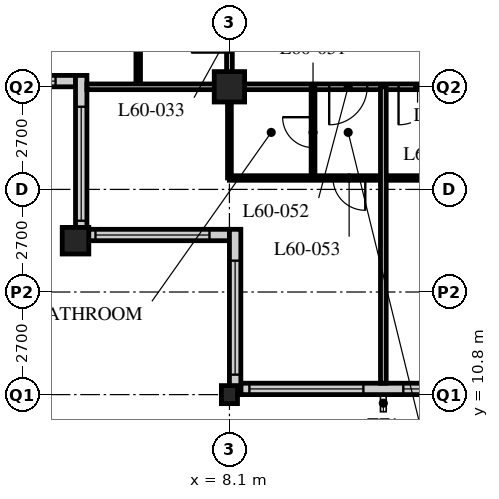
"""IFC4 building model, lengths in metres.
Left out: names, types, materials, properties, quantities, classifications, styles, units other than length and angle.
Written with IfcOpenShell. Run it as: python <this file> out.ifc"""

import sys

from ifc_helpers import new_model, si_unit, direction, frame, frame_2d, origin, origin_2d, place, context, subcontext, project, spatial, rectangle, hollow_rectangle, i_section, extrude, element, fill, save


model = new_model("IFC4")
c1 = context("Model", 3, precision=1e-05, world=origin(), true_north=direction((0.0, 1.0)))
c2 = subcontext(c1, "Body", "Model", "MODEL_VIEW")
j1 = project(units=[si_unit("LENGTHUNIT", "METRE"), si_unit("PLANEANGLEUNIT", "RADIAN")], contexts=[c1])
p1 = place(None, origin())
s1 = spatial("IfcSite", under=j1, at=p1, CompositionType="ELEMENT")
p2 = place(p1, origin())
s2 = spatial("IfcBuilding", under=s1, at=p2, CompositionType="ELEMENT")
p3 = place(p2, frame((0.0, 0.0, 231.6)))
s3 = spatial("IfcBuildingStorey", under=s2, at=p3, CompositionType="ELEMENT", Elevation=231.6)
p4 = place(p3, frame((4.05, 14.85, 0.0), z_axis=(0.0, 0.0, 1.0), x_axis=(1.0, 0.0, 0.0)))
e1 = element("IfcColumn", 1, at=p4, inside=s3, PredefinedType="COLUMN", context=c2, shape_type="SweptSolid", body=[
    extrude(hollow_rectangle(XDim=0.7, YDim=0.7, WallThickness=0.07, at=origin_2d()), origin(), (0.0, 0.0, 1.0), 3.6),
])
p5 = place(p3, frame((8.1, 10.8, 0.0), z_axis=(0.0, 0.0, 1.0), x_axis=(1.0, 0.0, 0.0)))
e2 = element("IfcColumn", 2, at=p5, inside=s3, PredefinedType="COLUMN", context=c2, shape_type="SweptSolid", body=[
    extrude(i_section(OverallWidth=0.424, OverallDepth=0.475, WebThickness=0.048, FlangeThickness=0.077, FilletRadius=0.015, at=origin_2d()), origin(), (0.0, 0.0, 1.0), 3.6),
])
p6 = place(p3, frame((8.1, 18.9, 0.0), z_axis=(0.0, 0.0, 1.0), x_axis=(1.0, 0.0, 0.0)))
e3 = element("IfcColumn", 3, at=p6, inside=s3, PredefinedType="COLUMN", context=c2, shape_type="SweptSolid", body=[
    extrude(hollow_rectangle(XDim=0.8, YDim=0.8, WallThickness=0.08, at=origin_2d()), origin(), (0.0, 0.0, 1.0), 3.6),
])
p7 = place(p3, frame((8.4, 10.95, 0.0), z_axis=(0.0, 0.0, 1.0), x_axis=(1.0, 0.0, 0.0)))
e4 = element("IfcWall", 4, at=p7, inside=s3, PredefinedType="SOLIDWALL", context=c2, shape_type="SweptSolid", body=[
    extrude(rectangle(XDim=40.2, YDim=0.3, at=frame_2d((20.1, 0.0))), origin(), (0.0, 0.0, 1.0), 2.35),
])
p8 = place(p7, frame((0.225, 0.0, 0.6)))
e5 = element("IfcOpeningElement", 5, at=p8, cuts=e4, PredefinedType="OPENING", context=c2, shape_type="SweptSolid", body=[
    extrude(rectangle(XDim=3.0, YDim=1.7, at=frame_2d((1.5, 0.85))), frame((0.0, 0.16, 0.0), z_axis=(0.0, -1.0, 0.0), x_axis=(1.0, 0.0, 0.0)), (0.0, 0.0, 1.0), 0.32),
])
p9 = place(p7, frame((4.275, 0.0, 0.6)))
e6 = element("IfcOpeningElement", 6, at=p9, cuts=e4, PredefinedType="OPENING", context=c2, shape_type="SweptSolid", body=[
    extrude(rectangle(XDim=3.0, YDim=1.7, at=frame_2d((1.5, 0.85))), frame((0.0, 0.16, 0.0), z_axis=(0.0, -1.0, 0.0), x_axis=(1.0, 0.0, 0.0)), (0.0, 0.0, 1.0), 0.32),
])
p10 = place(p7, frame((8.325, 0.0, 0.6)))
e7 = element("IfcOpeningElement", 7, at=p10, cuts=e4, PredefinedType="OPENING", context=c2, shape_type="SweptSolid", body=[
    extrude(rectangle(XDim=3.0, YDim=1.7, at=frame_2d((1.5, 0.85))), frame((0.0, 0.16, 0.0), z_axis=(0.0, -1.0, 0.0), x_axis=(1.0, 0.0, 0.0)), (0.0, 0.0, 1.0), 0.32),
])
p11 = place(p7, frame((12.375, 0.0, 0.6)))
e8 = element("IfcOpeningElement", 8, at=p11, cuts=e4, PredefinedType="OPENING", context=c2, shape_type="SweptSolid", body=[
    extrude(rectangle(XDim=3.0, YDim=1.7, at=frame_2d((1.5, 0.85))), frame((0.0, 0.16, 0.0), z_axis=(0.0, -1.0, 0.0), x_axis=(1.0, 0.0, 0.0)), (0.0, 0.0, 1.0), 0.32),
])
p12 = place(p7, frame((16.425, 0.0, 0.6)))
e9 = element("IfcOpeningElement", 9, at=p12, cuts=e4, PredefinedType="OPENING", context=c2, shape_type="SweptSolid", body=[
    extrude(rectangle(XDim=3.0, YDim=1.7, at=frame_2d((1.5, 0.85))), frame((0.0, 0.16, 0.0), z_axis=(0.0, -1.0, 0.0), x_axis=(1.0, 0.0, 0.0)), (0.0, 0.0, 1.0), 0.32),
])
p13 = place(p7, frame((20.475, 0.0, 0.6)))
e10 = element("IfcOpeningElement", 10, at=p13, cuts=e4, PredefinedType="OPENING", context=c2, shape_type="SweptSolid", body=[
    extrude(rectangle(XDim=3.0, YDim=1.7, at=frame_2d((1.5, 0.85))), frame((0.0, 0.16, 0.0), z_axis=(0.0, -1.0, 0.0), x_axis=(1.0, 0.0, 0.0)), (0.0, 0.0, 1.0), 0.32),
])
p14 = place(p7, frame((24.525, 0.0, 0.6)))
e11 = element("IfcOpeningElement", 11, at=p14, cuts=e4, PredefinedType="OPENING", context=c2, shape_type="SweptSolid", body=[
    extrude(rectangle(XDim=3.0, YDim=1.7, at=frame_2d((1.5, 0.85))), frame((0.0, 0.16, 0.0), z_axis=(0.0, -1.0, 0.0), x_axis=(1.0, 0.0, 0.0)), (0.0, 0.0, 1.0), 0.32),
])
p15 = place(p7, frame((28.575, 0.0, 0.6)))
e12 = element("IfcOpeningElement", 12, at=p15, cuts=e4, PredefinedType="OPENING", context=c2, shape_type="SweptSolid", body=[
    extrude(rectangle(XDim=3.0, YDim=1.7, at=frame_2d((1.5, 0.85))), frame((0.0, 0.16, 0.0), z_axis=(0.0, -1.0, 0.0), x_axis=(1.0, 0.0, 0.0)), (0.0, 0.0, 1.0), 0.32),
])
p16 = place(p7, frame((32.625, 0.0, 0.6)))
e13 = element("IfcOpeningElement", 13, at=p16, cuts=e4, PredefinedType="OPENING", context=c2, shape_type="SweptSolid", body=[
    extrude(rectangle(XDim=3.0, YDim=1.7, at=frame_2d((1.5, 0.85))), frame((0.0, 0.16, 0.0), z_axis=(0.0, -1.0, 0.0), x_axis=(1.0, 0.0, 0.0)), (0.0, 0.0, 1.0), 0.32),
])
p17 = place(p7, frame((36.675, 0.0, 0.6)))
e14 = element("IfcOpeningElement", 14, at=p17, cuts=e4, PredefinedType="OPENING", context=c2, shape_type="SweptSolid", body=[
    extrude(rectangle(XDim=3.0, YDim=1.7, at=frame_2d((1.5, 0.85))), frame((0.0, 0.16, 0.0), z_axis=(0.0, -1.0, 0.0), x_axis=(1.0, 0.0, 0.0)), (0.0, 0.0, 1.0), 0.32),
])
p18 = place(p3, frame((0.3, 19.05, 0.0), z_axis=(0.0, 0.0, 1.0), x_axis=(1.0, 0.0, 0.0)))
e15 = element("IfcWall", 15, at=p18, inside=s3, PredefinedType="SOLIDWALL", context=c2, shape_type="SweptSolid", body=[
    extrude(rectangle(XDim=3.75, YDim=0.3, at=frame_2d((1.875, 0.0))), origin(), (0.0, 0.0, 1.0), 2.35),
])
p19 = place(p18, frame((0.225, 0.0, 0.6)))
e16 = element("IfcOpeningElement", 16, at=p19, cuts=e15, PredefinedType="OPENING", context=c2, shape_type="SweptSolid", body=[
    extrude(rectangle(XDim=3.0, YDim=1.7, at=frame_2d((1.5, 0.85))), frame((0.0, 0.16, 0.0), z_axis=(0.0, -1.0, 0.0), x_axis=(1.0, 0.0, 0.0)), (0.0, 0.0, 1.0), 0.32),
])
p20 = place(p3, frame((4.2, 19.2, 0.0), z_axis=(0.0, 0.0, 1.0), x_axis=(0.0, -1.0, 0.0)))
e17 = element("IfcWall", 17, at=p20, inside=s3, PredefinedType="SOLIDWALL", context=c2, shape_type="SweptSolid", body=[
    extrude(rectangle(XDim=4.35, YDim=0.3, at=frame_2d((2.175, 0.0))), origin(), (0.0, 0.0, 1.0), 2.65),
])
p21 = place(p20, frame((0.825, 0.0, 0.6)))
e18 = element("IfcOpeningElement", 18, at=p21, cuts=e17, PredefinedType="OPENING", context=c2, shape_type="SweptSolid", body=[
    extrude(rectangle(XDim=3.0, YDim=1.7, at=frame_2d((1.5, 0.85))), frame((0.0, 0.16, 0.0), z_axis=(0.0, -1.0, 0.0), x_axis=(1.0, 0.0, 0.0)), (0.0, 0.0, 1.0), 0.32),
])
p22 = place(p3, frame((4.35, 15.0, 0.0), z_axis=(0.0, 0.0, 1.0), x_axis=(1.0, 0.0, 0.0)))
e19 = element("IfcWall", 19, at=p22, inside=s3, PredefinedType="SOLIDWALL", context=c2, shape_type="SweptSolid", body=[
    extrude(rectangle(XDim=3.75, YDim=0.3, at=frame_2d((1.875, 0.0))), origin(), (0.0, 0.0, 1.0), 2.65),
])
p23 = place(p22, frame((0.225, 0.0, 0.6)))
e20 = element("IfcOpeningElement", 20, at=p23, cuts=e19, PredefinedType="OPENING", context=c2, shape_type="SweptSolid", body=[
    extrude(rectangle(XDim=3.0, YDim=1.7, at=frame_2d((1.5, 0.85))), frame((0.0, 0.16, 0.0), z_axis=(0.0, -1.0, 0.0), x_axis=(1.0, 0.0, 0.0)), (0.0, 0.0, 1.0), 0.32),
])
p24 = place(p3, frame((8.25, 15.15, 0.0), z_axis=(0.0, 0.0, 1.0), x_axis=(0.0, -1.0, 0.0)))
e21 = element("IfcWall", 21, at=p24, inside=s3, PredefinedType="SOLIDWALL", context=c2, shape_type="SweptSolid", body=[
    extrude(rectangle(XDim=4.35, YDim=0.3, at=frame_2d((2.175, 0.0))), origin(), (0.0, 0.0, 1.0), 2.35),
])
p25 = place(p24, frame((0.825, 0.0, 0.6)))
e22 = element("IfcOpeningElement", 22, at=p25, cuts=e21, PredefinedType="OPENING", context=c2, shape_type="SweptSolid", body=[
    extrude(rectangle(XDim=3.0, YDim=1.7, at=frame_2d((1.5, 0.85))), frame((0.0, 0.16, 0.0), z_axis=(0.0, -1.0, 0.0), x_axis=(1.0, 0.0, 0.0)), (0.0, 0.0, 1.0), 0.32),
])
p26 = place(p3, frame((8.1, 18.9, 0.0), z_axis=(0.0, 0.0, 1.0), x_axis=(1.0, 0.0, 0.0)))
e23 = element("IfcWall", 23, at=p26, inside=s3, PredefinedType="PARTITIONING", context=c2, shape_type="SweptSolid", body=[
    extrude(rectangle(XDim=36.45, YDim=0.15, at=frame_2d((18.225, 0.0))), origin(), (0.0, 0.0, 1.0), 2.35),
])
p27 = place(p26, frame((4.45, 0.0, 0.0)))
e24 = element("IfcOpeningElement", 24, at=p27, cuts=e23, PredefinedType="OPENING", context=c2, shape_type="SweptSolid", body=[
    extrude(rectangle(XDim=1.0, YDim=2.1, at=frame_2d((0.5, 1.05))), frame((0.0, 0.085, 0.0), z_axis=(0.0, -1.0, 0.0), x_axis=(1.0, 0.0, 0.0)), (0.0, 0.0, 1.0), 0.17),
])
p28 = place(p26, frame((17.1, 0.0, 0.0)))
e25 = element("IfcOpeningElement", 25, at=p28, cuts=e23, PredefinedType="OPENING", context=c2, shape_type="SweptSolid", body=[
    extrude(rectangle(XDim=1.0, YDim=2.1, at=frame_2d((0.5, 1.05))), frame((0.0, 0.085, 0.0), z_axis=(0.0, -1.0, 0.0), x_axis=(1.0, 0.0, 0.0)), (0.0, 0.0, 1.0), 0.17),
])
p29 = place(p26, frame((29.05, 0.0, 0.0)))
e26 = element("IfcOpeningElement", 26, at=p29, cuts=e23, PredefinedType="OPENING", context=c2, shape_type="SweptSolid", body=[
    extrude(rectangle(XDim=1.0, YDim=2.1, at=frame_2d((0.5, 1.05))), frame((0.0, 0.085, 0.0), z_axis=(0.0, -1.0, 0.0), x_axis=(1.0, 0.0, 0.0)), (0.0, 0.0, 1.0), 0.17),
])
p30 = place(p26, frame((2.625, 0.0, 0.0)))
e27 = element("IfcOpeningElement", 27, at=p30, cuts=e23, PredefinedType="OPENING", context=c2, shape_type="SweptSolid", body=[
    extrude(rectangle(XDim=1.0, YDim=2.1, at=frame_2d((0.5, 1.05))), frame((0.0, 0.085, 0.0), z_axis=(0.0, -1.0, 0.0), x_axis=(1.0, 0.0, 0.0)), (0.0, 0.0, 1.0), 0.17),
])
p31 = place(p26, frame((33.925, 0.0, 0.0)))
e28 = element("IfcOpeningElement", 28, at=p31, cuts=e23, PredefinedType="OPENING", context=c2, shape_type="SweptSolid", body=[
    extrude(rectangle(XDim=1.0, YDim=2.1, at=frame_2d((0.5, 1.05))), frame((0.0, 0.085, 0.0), z_axis=(0.0, -1.0, 0.0), x_axis=(1.0, 0.0, 0.0)), (0.0, 0.0, 1.0), 0.17),
])
p32 = place(p3, frame((8.1, 18.9, 0.0), z_axis=(0.0, 0.0, 1.0), x_axis=(0.0, 1.0, 0.0)))
e29 = element("IfcWall", 29, at=p32, inside=s3, PredefinedType="PARTITIONING", context=c2, shape_type="SweptSolid", body=[
    extrude(rectangle(XDim=24.3, YDim=0.15, at=frame_2d((12.15, 0.0))), origin(), (0.0, 0.0, 1.0), 2.35),
])
p33 = place(p32, frame((0.9, 0.0, 0.0)))
e30 = element("IfcOpeningElement", 30, at=p33, cuts=e29, PredefinedType="OPENING", context=c2, shape_type="SweptSolid", body=[
    extrude(rectangle(XDim=1.0, YDim=2.1, at=frame_2d((0.5, 1.05))), frame((0.0, 0.085, 0.0), z_axis=(0.0, -1.0, 0.0), x_axis=(1.0, 0.0, 0.0)), (0.0, 0.0, 1.0), 0.17),
])
p34 = place(p32, frame((20.95, 0.0, 0.0)))
e31 = element("IfcOpeningElement", 31, at=p34, cuts=e29, PredefinedType="OPENING", context=c2, shape_type="SweptSolid", body=[
    extrude(rectangle(XDim=1.0, YDim=2.1, at=frame_2d((0.5, 1.05))), frame((0.0, 0.085, 0.0), z_axis=(0.0, -1.0, 0.0), x_axis=(1.0, 0.0, 0.0)), (0.0, 0.0, 1.0), 0.17),
])
p35 = place(p3, frame((5.7, 18.9, 0.0), z_axis=(0.0, 0.0, 1.0), x_axis=(0.0, 1.0, 0.0)))
e32 = element("IfcWall", 32, at=p35, inside=s3, PredefinedType="PARTITIONING", context=c2, shape_type="SweptSolid", body=[
    extrude(rectangle(XDim=20.25, YDim=0.12, at=frame_2d((10.125, 0.0))), origin(), (0.0, 0.0, 1.0), 3.35),
])
p36 = place(p35, frame((0.975, 0.0, 0.0)))
e33 = element("IfcOpeningElement", 33, at=p36, cuts=e32, PredefinedType="OPENING", context=c2, shape_type="SweptSolid", body=[
    extrude(rectangle(XDim=0.85, YDim=2.1, at=frame_2d((0.425, 1.05))), frame((0.0, 0.07, 0.0), z_axis=(0.0, -1.0, 0.0), x_axis=(1.0, 0.0, 0.0)), (0.0, 0.0, 1.0), 0.14),
])
p37 = place(p35, frame((8.425, 0.0, 0.0)))
e34 = element("IfcOpeningElement", 34, at=p37, cuts=e32, PredefinedType="OPENING", context=c2, shape_type="SweptSolid", body=[
    extrude(rectangle(XDim=0.85, YDim=2.1, at=frame_2d((0.425, 1.05))), frame((0.0, 0.07, 0.0), z_axis=(0.0, -1.0, 0.0), x_axis=(1.0, 0.0, 0.0)), (0.0, 0.0, 1.0), 0.14),
])
p38 = place(p35, frame((12.475, 0.0, 0.0)))
e35 = element("IfcOpeningElement", 35, at=p38, cuts=e32, PredefinedType="OPENING", context=c2, shape_type="SweptSolid", body=[
    extrude(rectangle(XDim=0.85, YDim=2.1, at=frame_2d((0.425, 1.05))), frame((0.0, 0.07, 0.0), z_axis=(0.0, -1.0, 0.0), x_axis=(1.0, 0.0, 0.0)), (0.0, 0.0, 1.0), 0.14),
])
p39 = place(p35, frame((16.525, 0.0, 0.0)))
e36 = element("IfcOpeningElement", 36, at=p39, cuts=e32, PredefinedType="OPENING", context=c2, shape_type="SweptSolid", body=[
    extrude(rectangle(XDim=0.85, YDim=2.1, at=frame_2d((0.425, 1.05))), frame((0.0, 0.07, 0.0), z_axis=(0.0, -1.0, 0.0), x_axis=(1.0, 0.0, 0.0)), (0.0, 0.0, 1.0), 0.14),
])
p40 = place(p3, frame((8.1, 16.5, 0.0), z_axis=(0.0, 0.0, 1.0), x_axis=(1.0, 0.0, 0.0)))
e37 = element("IfcWall", 37, at=p40, inside=s3, PredefinedType="PARTITIONING", context=c2, shape_type="SweptSolid", body=[
    extrude(rectangle(XDim=28.35, YDim=0.12, at=frame_2d((14.175, 0.0))), origin(), (0.0, 0.0, 1.0), 3.35),
])
p41 = place(p40, frame((5.025, 0.0, 0.0)))
e38 = element("IfcOpeningElement", 38, at=p41, cuts=e37, PredefinedType="OPENING", context=c2, shape_type="SweptSolid", body=[
    extrude(rectangle(XDim=0.85, YDim=2.1, at=frame_2d((0.425, 1.05))), frame((0.0, 0.07, 0.0), z_axis=(0.0, -1.0, 0.0), x_axis=(1.0, 0.0, 0.0)), (0.0, 0.0, 1.0), 0.14),
])
p42 = place(p40, frame((12.475, 0.0, 0.0)))
e39 = element("IfcOpeningElement", 39, at=p42, cuts=e37, PredefinedType="OPENING", context=c2, shape_type="SweptSolid", body=[
    extrude(rectangle(XDim=0.85, YDim=2.1, at=frame_2d((0.425, 1.05))), frame((0.0, 0.07, 0.0), z_axis=(0.0, -1.0, 0.0), x_axis=(1.0, 0.0, 0.0)), (0.0, 0.0, 1.0), 0.14),
])
p43 = place(p40, frame((17.175, 0.0, 0.0)))
e40 = element("IfcOpeningElement", 40, at=p43, cuts=e37, PredefinedType="OPENING", context=c2, shape_type="SweptSolid", body=[
    extrude(rectangle(XDim=0.85, YDim=2.1, at=frame_2d((0.425, 1.05))), frame((0.0, 0.07, 0.0), z_axis=(0.0, -1.0, 0.0), x_axis=(1.0, 0.0, 0.0)), (0.0, 0.0, 1.0), 0.14),
])
p44 = place(p40, frame((24.625, 0.0, 0.0)))
e41 = element("IfcOpeningElement", 41, at=p44, cuts=e37, PredefinedType="OPENING", context=c2, shape_type="SweptSolid", body=[
    extrude(rectangle(XDim=0.85, YDim=2.1, at=frame_2d((0.425, 1.05))), frame((0.0, 0.07, 0.0), z_axis=(0.0, -1.0, 0.0), x_axis=(1.0, 0.0, 0.0)), (0.0, 0.0, 1.0), 0.14),
])
p45 = place(p40, frame((2.725, 0.0, 0.0)))
e42 = element("IfcOpeningElement", 42, at=p45, cuts=e37, PredefinedType="OPENING", context=c2, shape_type="SweptSolid", body=[
    extrude(rectangle(XDim=0.85, YDim=2.1, at=frame_2d((0.425, 1.05))), frame((0.0, 0.07, 0.0), z_axis=(0.0, -1.0, 0.0), x_axis=(1.0, 0.0, 0.0)), (0.0, 0.0, 1.0), 0.14),
])
p46 = place(p3, frame((10.3, 18.9, 0.0), z_axis=(0.0, 0.0, 1.0), x_axis=(0.0, -1.0, 0.0)))
e43 = element("IfcWall", 43, at=p46, inside=s3, PredefinedType="PARTITIONING", context=c2, shape_type="SweptSolid", body=[
    extrude(rectangle(XDim=2.4, YDim=0.1, at=frame_2d((1.2, 0.0))), origin(), (0.0, 0.0, 1.0), 3.35),
])
p47 = place(p46, frame((0.8, 0.0, 0.0)))
e44 = element("IfcOpeningElement", 44, at=p47, cuts=e43, PredefinedType="OPENING", context=c2, shape_type="SweptSolid", body=[
    extrude(rectangle(XDim=0.8, YDim=2.1, at=frame_2d((0.4, 1.05))), frame((0.0, 0.06, 0.0), z_axis=(0.0, -1.0, 0.0), x_axis=(1.0, 0.0, 0.0)), (0.0, 0.0, 1.0), 0.12),
])
p48 = place(p3, frame((8.1, 18.9, 0.0), z_axis=(0.0, 0.0, 1.0), x_axis=(0.0, -1.0, 0.0)))
e45 = element("IfcWall", 45, at=p48, inside=s3, PredefinedType="PARTITIONING", context=c2, shape_type="SweptSolid", body=[
    extrude(rectangle(XDim=2.4, YDim=0.1, at=frame_2d((1.2, 0.0))), origin(), (0.0, 0.0, 1.0), 2.35),
])
p49 = place(p3, frame((4.35, 18.9, 0.0), z_axis=(0.0, 0.0, 1.0), x_axis=(1.0, 0.0, 0.0)))
e46 = element("IfcWall", 46, at=p49, inside=s3, PredefinedType="PARTITIONING", context=c2, shape_type="SweptSolid", body=[
    extrude(rectangle(XDim=3.75, YDim=0.15, at=frame_2d((1.875, 0.0))), origin(), (0.0, 0.0, 1.0), 2.35),
])
p50 = place(p3, frame((12.15, 18.9, 0.0), z_axis=(0.0, 0.0, 1.0), x_axis=(0.0, -1.0, 0.0)))
e47 = element("IfcWall", 47, at=p50, inside=s3, PredefinedType="PARTITIONING", context=c2, shape_type="SweptSolid", body=[
    extrude(rectangle(XDim=7.8, YDim=0.15, at=frame_2d((3.9, 0.0))), origin(), (0.0, 0.0, 1.0), 3.35),
])
p51 = place(p8, origin())
e48 = element("IfcWindow", 48, at=p51, inside=s3, PartitioningType="SINGLE_PANEL", PredefinedType="WINDOW", context=c2, shape_type="SweptSolid", body=[
    extrude(rectangle(XDim=3.0, YDim=1.7, at=frame_2d((1.5, 0.85))), frame((0.0, 0.03, 0.0), z_axis=(0.0, -1.0, 0.0), x_axis=(1.0, 0.0, 0.0)), (0.0, 0.0, 1.0), 0.06),
])
fill(e5, e48)
p52 = place(p9, origin())
e49 = element("IfcWindow", 49, at=p52, inside=s3, PartitioningType="SINGLE_PANEL", PredefinedType="WINDOW", context=c2, shape_type="SweptSolid", body=[
    extrude(rectangle(XDim=3.0, YDim=1.7, at=frame_2d((1.5, 0.85))), frame((0.0, 0.03, 0.0), z_axis=(0.0, -1.0, 0.0), x_axis=(1.0, 0.0, 0.0)), (0.0, 0.0, 1.0), 0.06),
])
fill(e6, e49)
p53 = place(p19, origin())
e50 = element("IfcWindow", 50, at=p53, inside=s3, PartitioningType="SINGLE_PANEL", PredefinedType="WINDOW", context=c2, shape_type="SweptSolid", body=[
    extrude(rectangle(XDim=3.0, YDim=1.7, at=frame_2d((1.5, 0.85))), frame((0.0, 0.03, 0.0), z_axis=(0.0, -1.0, 0.0), x_axis=(1.0, 0.0, 0.0)), (0.0, 0.0, 1.0), 0.06),
])
fill(e16, e50)
p54 = place(p21, origin())
e51 = element("IfcWindow", 51, at=p54, inside=s3, PartitioningType="SINGLE_PANEL", PredefinedType="WINDOW", context=c2, shape_type="SweptSolid", body=[
    extrude(rectangle(XDim=3.0, YDim=1.7, at=frame_2d((1.5, 0.85))), frame((0.0, 0.03, 0.0), z_axis=(0.0, -1.0, 0.0), x_axis=(1.0, 0.0, 0.0)), (0.0, 0.0, 1.0), 0.06),
])
fill(e18, e51)
p55 = place(p23, origin())
e52 = element("IfcWindow", 52, at=p55, inside=s3, PartitioningType="SINGLE_PANEL", PredefinedType="WINDOW", context=c2, shape_type="SweptSolid", body=[
    extrude(rectangle(XDim=3.0, YDim=1.7, at=frame_2d((1.5, 0.85))), frame((0.0, 0.03, 0.0), z_axis=(0.0, -1.0, 0.0), x_axis=(1.0, 0.0, 0.0)), (0.0, 0.0, 1.0), 0.06),
])
fill(e20, e52)
p56 = place(p25, origin())
e53 = element("IfcWindow", 53, at=p56, inside=s3, PartitioningType="SINGLE_PANEL", PredefinedType="WINDOW", context=c2, shape_type="SweptSolid", body=[
    extrude(rectangle(XDim=3.0, YDim=1.7, at=frame_2d((1.5, 0.85))), frame((0.0, 0.03, 0.0), z_axis=(0.0, -1.0, 0.0), x_axis=(1.0, 0.0, 0.0)), (0.0, 0.0, 1.0), 0.06),
])
fill(e22, e53)
p57 = place(p27, origin())
e54 = element("IfcDoor", 54, at=p57, inside=s3, OperationType="SINGLE_SWING_RIGHT", PredefinedType="DOOR", context=c2, shape_type="SweptSolid", body=[
    extrude(rectangle(XDim=1.0, YDim=2.1, at=frame_2d((0.5, 1.05))), frame((0.0, 0.025, 0.0), z_axis=(0.0, -1.0, 0.0), x_axis=(1.0, 0.0, 0.0)), (0.0, 0.0, 1.0), 0.05),
])
fill(e24, e54)
p58 = place(p33, origin())
e55 = element("IfcDoor", 55, at=p58, inside=s3, OperationType="SINGLE_SWING_LEFT", PredefinedType="DOOR", context=c2, shape_type="SweptSolid", body=[
    extrude(rectangle(XDim=1.0, YDim=2.1, at=frame_2d((0.5, 1.05))), frame((0.0, 0.025, 0.0), z_axis=(0.0, -1.0, 0.0), x_axis=(1.0, 0.0, 0.0)), (0.0, 0.0, 1.0), 0.05),
])
fill(e30, e55)
p59 = place(p47, origin())
e56 = element("IfcDoor", 56, at=p59, inside=s3, OperationType="SINGLE_SWING_RIGHT", PredefinedType="DOOR", context=c2, shape_type="SweptSolid", body=[
    extrude(rectangle(XDim=0.8, YDim=2.1, at=frame_2d((0.4, 1.05))), frame((0.0, 0.025, 0.0), z_axis=(0.0, -1.0, 0.0), x_axis=(1.0, 0.0, 0.0)), (0.0, 0.0, 1.0), 0.05),
])
fill(e44, e56)
p60 = place(p30, origin())
e57 = element("IfcDoor", 57, at=p60, inside=s3, OperationType="SINGLE_SWING_RIGHT", PredefinedType="DOOR", context=c2, shape_type="SweptSolid", body=[
    extrude(rectangle(XDim=1.0, YDim=2.1, at=frame_2d((0.5, 1.05))), frame((0.0, 0.025, 0.0), z_axis=(0.0, -1.0, 0.0), x_axis=(1.0, 0.0, 0.0)), (0.0, 0.0, 1.0), 0.05),
])
fill(e27, e57)
p61 = place(p45, origin())
e58 = element("IfcDoor", 58, at=p61, inside=s3, OperationType="SINGLE_SWING_LEFT", PredefinedType="DOOR", context=c2, shape_type="SweptSolid", body=[
    extrude(rectangle(XDim=0.85, YDim=2.1, at=frame_2d((0.425, 1.05))), frame((0.0, 0.025, 0.0), z_axis=(0.0, -1.0, 0.0), x_axis=(1.0, 0.0, 0.0)), (0.0, 0.0, 1.0), 0.05),
])
fill(e42, e58)
save(model, sys.argv[1])
